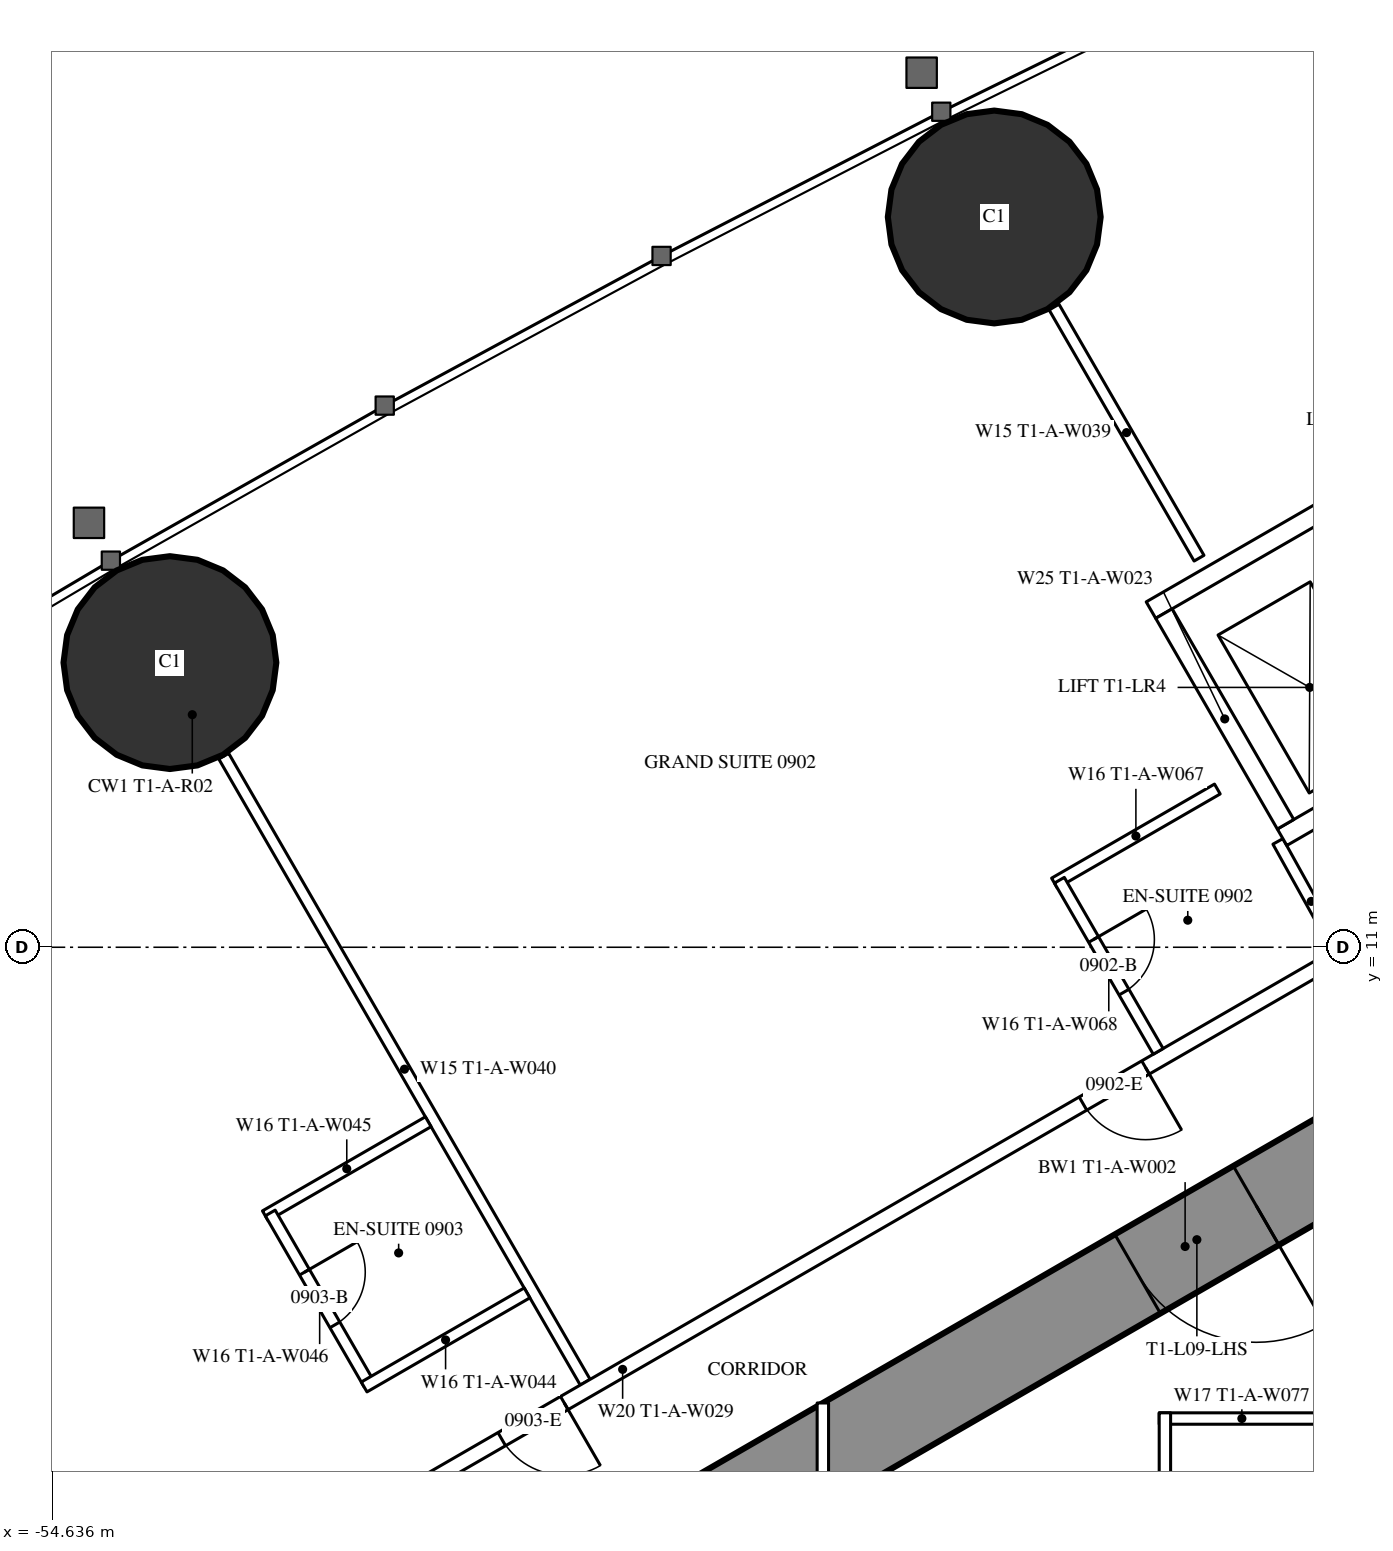
"""IFC4 building model, lengths in metres.
Left out: names, types, materials, properties, quantities, classifications, styles, units other than length and angle.
Written with IfcOpenShell. Run it as: python <this file> out.ifc"""

import sys

from ifc_helpers import new_model, si_unit, direction, frame, frame_2d, origin, origin_2d, place, context, subcontext, project, spatial, rectangle, hollow_circle, extrude, element, fill, save


model = new_model("IFC4")
c1 = context("Model", 3, precision=1e-05, world=origin(), true_north=direction((0.0, 1.0)))
c2 = subcontext(c1, "Body", "Model", "MODEL_VIEW")
j1 = project(units=[si_unit("LENGTHUNIT", "METRE"), si_unit("PLANEANGLEUNIT", "RADIAN")], contexts=[c1])
p1 = place(None, origin())
s1 = spatial("IfcSite", under=j1, at=p1, CompositionType="ELEMENT")
p2 = place(p1, origin())
s2 = spatial("IfcBuilding", under=s1, at=p2, CompositionType="ELEMENT")
p3 = place(p2, frame((0.0, 0.0, 39.0)))
s3 = spatial("IfcBuildingStorey", under=s2, at=p3, CompositionType="ELEMENT", Elevation=39.0)
for number, where, z_axis, x_axis in (
    (1, (-42.245, 20.607, 0.0), (0.0, 0.0, 1.0), (1.0, 0.0, 0.0)),
    (2, (-53.09, 14.745, 0.0), (0.0, 0.0, 1.0), (1.0, 0.0, 0.0)),
):
    element("IfcColumn", number, at=place(p3, frame(where, z_axis=z_axis, x_axis=x_axis)), inside=s3, PredefinedType="COLUMN", context=c2, shape_type="SweptSolid", body=[
        extrude(hollow_circle(Radius=1.4, WallThickness=0.12, at=origin_2d()), origin(), (0.0, 0.0, 1.0), 3.5),
    ])
p4 = place(p3, frame((-27.2, 14.3, 0.0), z_axis=(0.0, 0.0, 1.0), x_axis=(-0.866026593062, -0.499997940104, 0.0)))
e3 = element("IfcWall", 3, at=p4, inside=s3, PredefinedType="SHEAR", context=c2, shape_type="SweptSolid", body=[
    extrude(rectangle(XDim=28.946, YDim=1.2, at=frame_2d((14.473, 0.0))), origin(), (0.0, 0.0, 1.0), 3.5),
])
p5 = place(p4, frame((4.6, 0.0, 0.0)))
e4 = element("IfcOpeningElement", 4, at=p5, cuts=e3, PredefinedType="OPENING", context=c2, shape_type="SweptSolid", body=[
    extrude(rectangle(XDim=1.0, YDim=2.2, at=frame_2d((0.5, 1.1))), frame((0.0, 0.61, 0.0), z_axis=(0.0, -1.0, 0.0), x_axis=(1.0, 0.0, 0.0)), (0.0, 0.0, 1.0), 1.22),
])
p6 = place(p4, frame((13.395, 0.0, 0.0)))
e5 = element("IfcOpeningElement", 5, at=p6, cuts=e3, PredefinedType="OPENING", context=c2, shape_type="SweptSolid", body=[
    extrude(rectangle(XDim=1.8, YDim=2.2, at=frame_2d((0.9, 1.1))), frame((0.0, 0.61, 0.0), z_axis=(0.0, -1.0, 0.0), x_axis=(1.0, 0.0, 0.0)), (0.0, 0.0, 1.0), 1.22),
])
p7 = place(p3, frame((-47.627, 5.278, 0.0), z_axis=(0.0, 0.0, 1.0), x_axis=(-0.500009844318, 0.86601972009, 0.0)))
e6 = element("IfcWall", 6, at=p7, inside=s3, PredefinedType="PARTITIONING", context=c2, shape_type="SweptSolid", body=[
    extrude(rectangle(XDim=9.51, YDim=0.15, at=frame_2d((4.755, 0.0))), origin(), (0.0, 0.0, 1.0), 2.25),
])
p8 = place(p3, frame((-39.551, 16.119, 0.0), z_axis=(0.0, 0.0, 1.0), x_axis=(-0.500014214979, 0.866017196607, 0.0)))
e7 = element("IfcWall", 7, at=p8, inside=s3, PredefinedType="PARTITIONING", context=c2, shape_type="SweptSolid", body=[
    extrude(rectangle(XDim=3.815, YDim=0.15, at=frame_2d((1.907, 0.0))), origin(), (0.0, 0.0, 1.0), 3.25),
])
p9 = place(p3, frame((-37.7, 10.894, 0.0), z_axis=(0.0, 0.0, 1.0), x_axis=(-0.866027905338, -0.499995667157, 0.0)))
e8 = element("IfcWall", 8, at=p9, inside=s3, PredefinedType="PARTITIONING", context=c2, shape_type="SweptSolid", body=[
    extrude(rectangle(XDim=21.787, YDim=0.2, at=frame_2d((10.894, 0.0))), origin(), (0.0, 0.0, 1.0), 3.25),
])
p10 = place(p9, frame((11.78, 0.0, 0.0)))
e9 = element("IfcOpeningElement", 9, at=p10, cuts=e8, PredefinedType="OPENING", context=c2, shape_type="SweptSolid", body=[
    extrude(rectangle(XDim=0.95, YDim=2.2, at=frame_2d((0.475, 1.1))), frame((0.0, 0.11, 0.0), z_axis=(0.0, -1.0, 0.0), x_axis=(1.0, 0.0, 0.0)), (0.0, 0.0, 1.0), 0.22),
])
p11 = place(p9, frame((2.95, 0.0, 0.0)))
e10 = element("IfcOpeningElement", 10, at=p11, cuts=e8, PredefinedType="OPENING", context=c2, shape_type="SweptSolid", body=[
    extrude(rectangle(XDim=0.95, YDim=2.2, at=frame_2d((0.475, 1.1))), frame((0.0, 0.11, 0.0), z_axis=(0.0, -1.0, 0.0), x_axis=(1.0, 0.0, 0.0)), (0.0, 0.0, 1.0), 0.22),
])
p12 = place(p3, frame((-38.513, 12.392, 0.0), z_axis=(0.0, 0.0, 1.0), x_axis=(0.485585508183, -0.874189175317, 0.0)))
e11 = element("IfcWall", 11, at=p12, inside=s3, PredefinedType="PARTITIONING", context=c2, shape_type="SweptSolid", body=[
    extrude(rectangle(XDim=1.805, YDim=0.15, at=frame_2d((0.902, 0.0))), origin(), (0.0, 0.0, 1.0), 3.25),
])
p13 = place(p3, frame((-49.692, 8.704, 0.0), z_axis=(0.0, 0.0, 1.0), x_axis=(-0.866073894602, -0.499916002032, 0.0)))
e12 = element("IfcWall", 12, at=p13, inside=s3, PredefinedType="PARTITIONING", context=c2, shape_type="SweptSolid", body=[
    extrude(rectangle(XDim=2.475, YDim=0.15, at=frame_2d((1.238, 0.0))), origin(), (0.0, 0.0, 1.0), 3.25),
])
p14 = place(p3, frame((-50.47, 5.253, 0.0), z_axis=(0.0, 0.0, 1.0), x_axis=(-0.500006934395, 0.866021400173, 0.0)))
e13 = element("IfcWall", 13, at=p14, inside=s3, PredefinedType="PARTITIONING", context=c2, shape_type="SweptSolid", body=[
    extrude(rectangle(XDim=2.6, YDim=0.15, at=frame_2d((1.3, 0.0))), origin(), (0.0, 0.0, 1.0), 3.25),
])
p15 = place(p14, frame((0.9, 0.0, 0.0)))
e14 = element("IfcOpeningElement", 14, at=p15, cuts=e13, PredefinedType="OPENING", context=c2, shape_type="SweptSolid", body=[
    extrude(rectangle(XDim=0.8, YDim=2.2, at=frame_2d((0.4, 1.1))), frame((0.0, 0.085, 0.0), z_axis=(0.0, -1.0, 0.0), x_axis=(1.0, 0.0, 0.0)), (0.0, 0.0, 1.0), 0.17),
])
p16 = place(p3, frame((-48.392, 6.453, 0.0), z_axis=(0.0, 0.0, 1.0), x_axis=(-0.86604923931, -0.499958713387, 0.0)))
e15 = element("IfcWall", 15, at=p16, inside=s3, PredefinedType="PARTITIONING", context=c2, shape_type="SweptSolid", body=[
    extrude(rectangle(XDim=2.475, YDim=0.15, at=frame_2d((1.237, 0.0))), origin(), (0.0, 0.0, 1.0), 3.25),
])
p17 = place(p3, frame((-39.31, 13.082, 0.0), z_axis=(0.0, 0.0, 1.0), x_axis=(-0.866031185235, -0.4999899861, 0.0)))
e16 = element("IfcWall", 16, at=p17, inside=s3, PredefinedType="PARTITIONING", context=c2, shape_type="SweptSolid", body=[
    extrude(rectangle(XDim=2.475, YDim=0.15, at=frame_2d((1.238, 0.0))), origin(), (0.0, 0.0, 1.0), 3.25),
])
p18 = place(p3, frame((-40.088, 9.63, 0.0), z_axis=(0.0, 0.0, 1.0), x_axis=(-0.500006934395, 0.866021400173, 0.0)))
e17 = element("IfcWall", 17, at=p18, inside=s3, PredefinedType="PARTITIONING", context=c2, shape_type="SweptSolid", body=[
    extrude(rectangle(XDim=2.6, YDim=0.15, at=frame_2d((1.3, 0.0))), origin(), (0.0, 0.0, 1.0), 3.25),
])
p19 = place(p18, frame((0.9, 0.0, 0.0)))
e18 = element("IfcOpeningElement", 18, at=p19, cuts=e17, PredefinedType="OPENING", context=c2, shape_type="SweptSolid", body=[
    extrude(rectangle(XDim=0.8, YDim=2.2, at=frame_2d((0.4, 1.1))), frame((0.0, 0.085, 0.0), z_axis=(0.0, -1.0, 0.0), x_axis=(1.0, 0.0, 0.0)), (0.0, 0.0, 1.0), 0.17),
])
p20 = place(p3, frame((-37.9, 4.8, 0.0), z_axis=(0.0, 0.0, 1.0), x_axis=(-1.0, 0.0, 0.0)))
e19 = element("IfcWall", 19, at=p20, inside=s3, PredefinedType="PARTITIONING", context=c2, shape_type="SweptSolid", body=[
    extrude(rectangle(XDim=2.175, YDim=0.15, at=frame_2d((1.087, 0.0))), origin(), (0.0, 0.0, 1.0), 3.25),
])
p21 = place(p3, frame((-40.0, 4.875, 0.0), z_axis=(0.0, 0.0, 1.0), x_axis=(0.0, -1.0, 0.0)))
e20 = element("IfcWall", 20, at=p21, inside=s3, PredefinedType="PARTITIONING", context=c2, shape_type="SweptSolid", body=[
    extrude(rectangle(XDim=3.75, YDim=0.15, at=frame_2d((1.875, 0.0))), origin(), (0.0, 0.0, 1.0), 3.25),
])
p22 = place(p21, frame((1.375, 0.0, 0.0)))
e21 = element("IfcOpeningElement", 21, at=p22, cuts=e20, PredefinedType="OPENING", context=c2, shape_type="SweptSolid", body=[
    extrude(rectangle(XDim=1.0, YDim=2.2, at=frame_2d((0.5, 1.1))), frame((0.0, 0.085, 0.0), z_axis=(0.0, -1.0, 0.0), x_axis=(1.0, 0.0, 0.0)), (0.0, 0.0, 1.0), 0.17),
])
p23 = place(p3, frame((-44.5, 5.005, 0.0), z_axis=(0.0, 0.0, 1.0), x_axis=(0.0, -1.0, 0.0)))
e22 = element("IfcWall", 22, at=p23, inside=s3, PredefinedType="PARTITIONING", context=c2, shape_type="SweptSolid", body=[
    extrude(rectangle(XDim=10.009, YDim=0.15, at=frame_2d((5.005, 0.0))), origin(), (0.0, 0.0, 1.0), 2.45),
])
p24 = place(p23, frame((4.505, 0.0, 0.0)))
e23 = element("IfcOpeningElement", 23, at=p24, cuts=e22, PredefinedType="OPENING", context=c2, shape_type="SweptSolid", body=[
    extrude(rectangle(XDim=1.0, YDim=2.2, at=frame_2d((0.5, 1.1))), frame((0.0, 0.085, 0.0), z_axis=(0.0, -1.0, 0.0), x_axis=(1.0, 0.0, 0.0)), (0.0, 0.0, 1.0), 0.17),
])
p25 = place(p3, frame((-31.01, 16.747, 0.0), z_axis=(0.0, 0.0, 1.0), x_axis=(-0.866028165386, -0.499995216735, 0.0)))
e24 = element("IfcWall", 24, at=p25, inside=s3, PredefinedType="PARTITIONING", context=c2, shape_type="SweptSolid", body=[
    extrude(rectangle(XDim=8.6, YDim=0.25, at=frame_2d((4.3, 0.0))), origin(), (0.0, 0.0, 1.0), 3.25),
])
p26 = place(p25, frame((0.75, 0.0, 0.0)))
e25 = element("IfcOpeningElement", 25, at=p26, cuts=e24, PredefinedType="OPENING", context=c2, shape_type="SweptSolid", body=[
    extrude(rectangle(XDim=1.1, YDim=2.2, at=frame_2d((0.55, 1.1))), frame((0.0, 0.135, 0.0), z_axis=(0.0, -1.0, 0.0), x_axis=(1.0, 0.0, 0.0)), (0.0, 0.0, 1.0), 0.27),
])
p27 = place(p25, frame((2.75, 0.0, 0.0)))
e26 = element("IfcOpeningElement", 26, at=p27, cuts=e24, PredefinedType="OPENING", context=c2, shape_type="SweptSolid", body=[
    extrude(rectangle(XDim=1.1, YDim=2.2, at=frame_2d((0.55, 1.1))), frame((0.0, 0.135, 0.0), z_axis=(0.0, -1.0, 0.0), x_axis=(1.0, 0.0, 0.0)), (0.0, 0.0, 1.0), 0.27),
])
p28 = place(p25, frame((4.75, 0.0, 0.0)))
e27 = element("IfcOpeningElement", 27, at=p28, cuts=e24, PredefinedType="OPENING", context=c2, shape_type="SweptSolid", body=[
    extrude(rectangle(XDim=1.1, YDim=2.2, at=frame_2d((0.55, 1.1))), frame((0.0, 0.135, 0.0), z_axis=(0.0, -1.0, 0.0), x_axis=(1.0, 0.0, 0.0)), (0.0, 0.0, 1.0), 0.27),
])
p29 = place(p25, frame((6.75, 0.0, 0.0)))
e28 = element("IfcOpeningElement", 28, at=p29, cuts=e24, PredefinedType="OPENING", context=c2, shape_type="SweptSolid", body=[
    extrude(rectangle(XDim=1.1, YDim=2.2, at=frame_2d((0.55, 1.1))), frame((0.0, 0.135, 0.0), z_axis=(0.0, -1.0, 0.0), x_axis=(1.0, 0.0, 0.0)), (0.0, 0.0, 1.0), 0.27),
])
p30 = place(p3, frame((-32.736, 19.736, 0.0), z_axis=(0.0, 0.0, 1.0), x_axis=(-0.866028165386, -0.499995216735, 0.0)))
e29 = element("IfcWall", 29, at=p30, inside=s3, PredefinedType="PARTITIONING", context=c2, shape_type="SweptSolid", body=[
    extrude(rectangle(XDim=8.6, YDim=0.25, at=frame_2d((4.3, 0.0))), origin(), (0.0, 0.0, 1.0), 3.25),
])
p31 = place(p3, frame((-38.413, 12.618, 0.0), z_axis=(0.0, 0.0, 1.0), x_axis=(-0.499872130319, 0.866099216793, 0.0)))
e30 = element("IfcWall", 30, at=p31, inside=s3, PredefinedType="PARTITIONING", context=c2, shape_type="SweptSolid", body=[
    extrude(rectangle(XDim=3.2, YDim=0.25, at=frame_2d((1.6, 0.0))), origin(), (0.0, 0.0, 1.0), 3.25),
])
p32 = place(p15, origin())
e31 = element("IfcDoor", 31, at=p32, inside=s3, OperationType="SINGLE_SWING_RIGHT", PredefinedType="DOOR", context=c2, shape_type="SweptSolid", body=[
    extrude(rectangle(XDim=0.8, YDim=2.2, at=frame_2d((0.4, 1.1))), frame((0.0, 0.025, 0.0), z_axis=(0.0, -1.0, 0.0), x_axis=(1.0, 0.0, 0.0)), (0.0, 0.0, 1.0), 0.05),
])
fill(e14, e31)
p33 = place(p10, origin())
e32 = element("IfcDoor", 32, at=p33, inside=s3, OperationType="SINGLE_SWING_LEFT", PredefinedType="DOOR", context=c2, shape_type="SweptSolid", body=[
    extrude(rectangle(XDim=0.95, YDim=2.2, at=frame_2d((0.475, 1.1))), frame((0.0, 0.025, 0.0), z_axis=(0.0, -1.0, 0.0), x_axis=(1.0, 0.0, 0.0)), (0.0, 0.0, 1.0), 0.05),
])
fill(e9, e32)
p34 = place(p19, origin())
e33 = element("IfcDoor", 33, at=p34, inside=s3, OperationType="SINGLE_SWING_RIGHT", PredefinedType="DOOR", context=c2, shape_type="SweptSolid", body=[
    extrude(rectangle(XDim=0.8, YDim=2.2, at=frame_2d((0.4, 1.1))), frame((0.0, 0.025, 0.0), z_axis=(0.0, -1.0, 0.0), x_axis=(1.0, 0.0, 0.0)), (0.0, 0.0, 1.0), 0.05),
])
fill(e18, e33)
p35 = place(p11, origin())
e34 = element("IfcDoor", 34, at=p35, inside=s3, OperationType="SINGLE_SWING_LEFT", PredefinedType="DOOR", context=c2, shape_type="SweptSolid", body=[
    extrude(rectangle(XDim=0.95, YDim=2.2, at=frame_2d((0.475, 1.1))), frame((0.0, 0.025, 0.0), z_axis=(0.0, -1.0, 0.0), x_axis=(1.0, 0.0, 0.0)), (0.0, 0.0, 1.0), 0.05),
])
fill(e10, e34)
p36 = place(p6, origin())
e35 = element("IfcDoor", 35, at=p36, inside=s3, OperationType="DOUBLE_DOOR_SINGLE_SWING", PredefinedType="DOOR", context=c2, shape_type="SweptSolid", body=[
    extrude(rectangle(XDim=1.8, YDim=2.2, at=frame_2d((0.9, 1.1))), frame((0.0, 0.025, 0.0), z_axis=(0.0, -1.0, 0.0), x_axis=(1.0, 0.0, 0.0)), (0.0, 0.0, 1.0), 0.05),
])
fill(e5, e35)
save(model, sys.argv[1])
